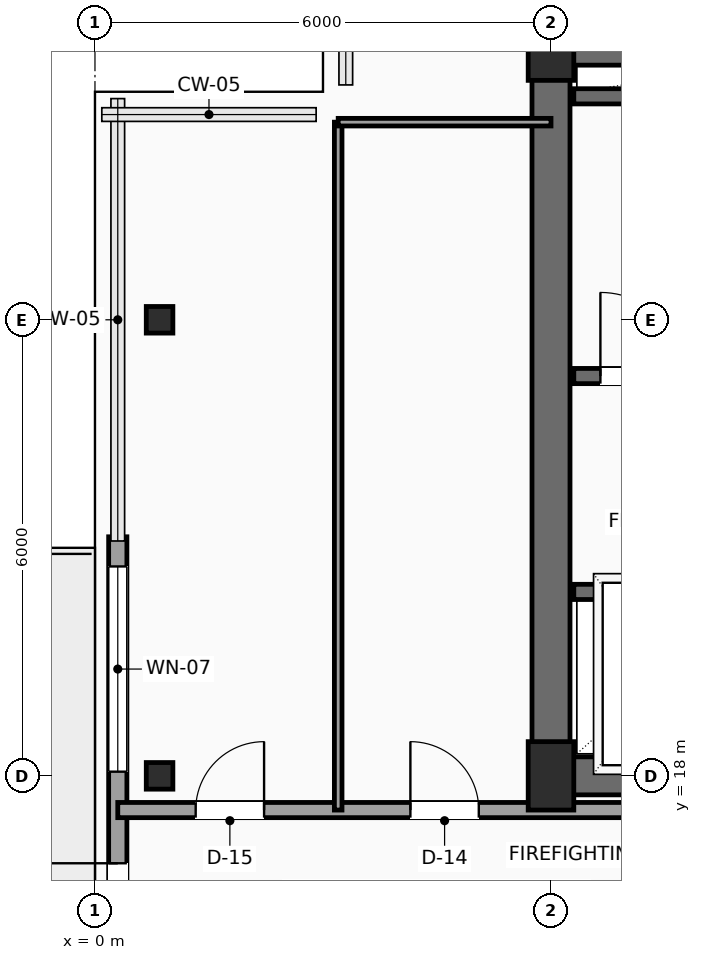
"""IFC4 building model, lengths in metres.
Left out: names, types, materials, properties, quantities, classifications, styles, units other than length and angle.
Written with IfcOpenShell. Run it as: python <this file> out.ifc"""

import sys

from ifc_helpers import new_model, si_unit, direction, frame, frame_2d, origin, origin_2d, place, context, subcontext, project, spatial, rectangle, hollow_rectangle, extrude, element, fill, save


model = new_model("IFC4")
c1 = context("Model", 3, precision=1e-05, world=origin(), true_north=direction((0.0, 1.0)))
c2 = subcontext(c1, "Body", "Model", "MODEL_VIEW")
j1 = project(units=[si_unit("LENGTHUNIT", "METRE"), si_unit("PLANEANGLEUNIT", "RADIAN")], contexts=[c1])
p1 = place(None, origin())
s1 = spatial("IfcSite", under=j1, at=p1, CompositionType="ELEMENT")
p2 = place(p1, origin())
s2 = spatial("IfcBuilding", under=s1, at=p2, CompositionType="ELEMENT")
p3 = place(p2, frame((0.0, 0.0, 253.7)))
s3 = spatial("IfcBuildingStorey", under=s2, at=p3, CompositionType="ELEMENT", Elevation=253.7)
for number, where, z_axis, x_axis in (
    (1, (6.0, 18.0, 0.0), (0.0, 0.0, 1.0), (1.0, 0.0, 0.0)),
    (2, (6.0, 27.6, 0.0), (0.0, 0.0, 1.0), (1.0, 0.0, 0.0)),
):
    element("IfcColumn", number, at=place(p3, frame(where, z_axis=z_axis, x_axis=x_axis)), inside=s3, PredefinedType="COLUMN", context=c2, shape_type="SweptSolid", body=[
        extrude(rectangle(XDim=0.6, YDim=0.9, at=origin_2d()), origin(), (0.0, 0.0, 1.0), 3.5),
    ])
for number, where, z_axis, x_axis in (
    (3, (0.85, 18.0, 0.0), (0.0, 0.0, 1.0), (1.0, 0.0, 0.0)),
    (4, (0.85, 24.0, 0.0), (0.0, 0.0, 1.0), (1.0, 0.0, 0.0)),
):
    element("IfcColumn", number, at=place(p3, frame(where, z_axis=z_axis, x_axis=x_axis)), inside=s3, PredefinedType="COLUMN", context=c2, shape_type="SweptSolid", body=[
        extrude(hollow_rectangle(XDim=0.35, YDim=0.35, WallThickness=0.016, InnerFilletRadius=0.016, OuterFilletRadius=0.032, at=origin_2d()), origin(), (0.0, 0.0, 1.0), 3.5),
    ])
p4 = place(p3, frame((0.3, 11.855, 0.0), z_axis=(0.0, 0.0, 1.0), x_axis=(0.0, 1.0, 0.0)))
e5 = element("IfcWall", 5, at=p4, inside=s3, PredefinedType="SOLIDWALL", context=c2, shape_type="SweptSolid", body=[
    extrude(rectangle(XDim=9.29, YDim=0.24, at=frame_2d((4.645, 0.0))), origin(), (0.0, 0.0, 1.0), 3.3),
])
p5 = place(p4, frame((3.945, 0.0, 0.0)))
e6 = element("IfcOpeningElement", 6, at=p5, cuts=e5, PredefinedType="OPENING", context=c2, shape_type="SweptSolid", body=[
    extrude(rectangle(XDim=1.05, YDim=2.2, at=frame_2d((0.525, 1.1))), frame((0.0, 0.13, 0.0), z_axis=(0.0, -1.0, 0.0), x_axis=(1.0, 0.0, 0.0)), (0.0, 0.0, 1.0), 0.26),
])
p6 = place(p4, frame((6.2, 0.0, 0.6)))
e7 = element("IfcOpeningElement", 7, at=p6, cuts=e5, PredefinedType="OPENING", context=c2, shape_type="SweptSolid", body=[
    extrude(rectangle(XDim=2.7, YDim=2.3, at=frame_2d((1.35, 1.15))), frame((0.0, 0.13, 0.0), z_axis=(0.0, -1.0, 0.0), x_axis=(1.0, 0.0, 0.0)), (0.0, 0.0, 1.0), 0.26),
])
p7 = place(p4, frame((0.7, 0.0, 0.6)))
e8 = element("IfcOpeningElement", 8, at=p7, cuts=e5, PredefinedType="OPENING", context=c2, shape_type="SweptSolid", body=[
    extrude(rectangle(XDim=0.9, YDim=2.2, at=frame_2d((0.45, 1.1))), frame((0.0, 0.13, 0.0), z_axis=(0.0, -1.0, 0.0), x_axis=(1.0, 0.0, 0.0)), (0.0, 0.0, 1.0), 0.26),
])
p8 = place(p3, frame((6.0, 18.0, 0.0), z_axis=(0.0, 0.0, 1.0), x_axis=(1.0, 0.0, 0.0)))
e9 = element("IfcWall", 9, at=p8, inside=s3, PredefinedType="SHEAR", context=c2, shape_type="SweptSolid", body=[
    extrude(rectangle(XDim=12.0, YDim=0.5, at=frame_2d((6.0, 0.0))), origin(), (0.0, 0.0, 1.0), 3.3),
])
p9 = place(p8, frame((7.15, 0.0, 0.0)))
e10 = element("IfcOpeningElement", 10, at=p9, cuts=e9, PredefinedType="OPENING", context=c2, shape_type="SweptSolid", body=[
    extrude(rectangle(XDim=1.6, YDim=2.3, at=frame_2d((0.8, 1.15))), frame((0.0, 0.26, 0.0), z_axis=(0.0, -1.0, 0.0), x_axis=(1.0, 0.0, 0.0)), (0.0, 0.0, 1.0), 0.52),
])
p10 = place(p3, frame((6.0, 27.6, 0.0), z_axis=(0.0, 0.0, 1.0), x_axis=(1.0, 0.0, 0.0)))
e11 = element("IfcWall", 11, at=p10, inside=s3, PredefinedType="SHEAR", context=c2, shape_type="SweptSolid", body=[
    extrude(rectangle(XDim=12.0, YDim=0.5, at=frame_2d((6.0, 0.0))), origin(), (0.0, 0.0, 1.0), 3.3),
])
p11 = place(p10, frame((10.3, 0.0, 0.0)))
e12 = element("IfcOpeningElement", 12, at=p11, cuts=e11, PredefinedType="OPENING", context=c2, shape_type="SweptSolid", body=[
    extrude(rectangle(XDim=0.9, YDim=2.15, at=frame_2d((0.45, 1.075))), frame((0.0, 0.26, 0.0), z_axis=(0.0, -1.0, 0.0), x_axis=(1.0, 0.0, 0.0)), (0.0, 0.0, 1.0), 0.52),
])
p12 = place(p3, frame((6.0, 18.0, 0.0), z_axis=(0.0, 0.0, 1.0), x_axis=(0.0, 1.0, 0.0)))
e13 = element("IfcWall", 13, at=p12, inside=s3, PredefinedType="SHEAR", context=c2, shape_type="SweptSolid", body=[
    extrude(rectangle(XDim=9.6, YDim=0.5, at=frame_2d((4.8, 0.0))), origin(), (0.0, 0.0, 1.0), 3.3),
])
p13 = place(p3, frame((6.3, 23.26, 0.0), z_axis=(0.0, 0.0, 1.0), x_axis=(1.0, 0.0, 0.0)))
e14 = element("IfcWall", 14, at=p13, inside=s3, PredefinedType="SHEAR", context=c2, shape_type="SweptSolid", body=[
    extrude(rectangle(XDim=8.88, YDim=0.2, at=frame_2d((4.44, 0.0))), origin(), (0.0, 0.0, 1.0), 3.3),
])
p14 = place(p13, frame((0.35, 0.0, 0.0)))
e15 = element("IfcOpeningElement", 15, at=p14, cuts=e14, PredefinedType="OPENING", context=c2, shape_type="SweptSolid", body=[
    extrude(rectangle(XDim=1.1, YDim=2.2, at=frame_2d((0.55, 1.1))), frame((0.0, 0.11, 0.0), z_axis=(0.0, -1.0, 0.0), x_axis=(1.0, 0.0, 0.0)), (0.0, 0.0, 1.0), 0.22),
])
p15 = place(p3, frame((6.3, 26.94, 0.0), z_axis=(0.0, 0.0, 1.0), x_axis=(1.0, 0.0, 0.0)))
e16 = element("IfcWall", 16, at=p15, inside=s3, PredefinedType="SHEAR", context=c2, shape_type="SweptSolid", body=[
    extrude(rectangle(XDim=8.88, YDim=0.2, at=frame_2d((4.44, 0.0))), origin(), (0.0, 0.0, 1.0), 3.3),
])
p16 = place(p3, frame((6.3, 20.42, 0.0), z_axis=(0.0, 0.0, 1.0), x_axis=(1.0, 0.0, 0.0)))
e17 = element("IfcWall", 17, at=p16, inside=s3, PredefinedType="SHEAR", context=c2, shape_type="SweptSolid", body=[
    extrude(rectangle(XDim=4.95, YDim=0.2, at=frame_2d((2.475, 0.0))), origin(), (0.0, 0.0, 1.0), 3.3),
])
p17 = place(p16, frame((0.65, 0.0, 0.0)))
e18 = element("IfcOpeningElement", 18, at=p17, cuts=e17, PredefinedType="OPENING", context=c2, shape_type="SweptSolid", body=[
    extrude(rectangle(XDim=1.1, YDim=2.2, at=frame_2d((0.55, 1.1))), frame((0.0, 0.11, 0.0), z_axis=(0.0, -1.0, 0.0), x_axis=(1.0, 0.0, 0.0)), (0.0, 0.0, 1.0), 0.22),
])
p18 = place(p16, frame((3.05, 0.0, 0.0)))
e19 = element("IfcOpeningElement", 19, at=p18, cuts=e17, PredefinedType="OPENING", context=c2, shape_type="SweptSolid", body=[
    extrude(rectangle(XDim=1.1, YDim=2.2, at=frame_2d((0.55, 1.1))), frame((0.0, 0.11, 0.0), z_axis=(0.0, -1.0, 0.0), x_axis=(1.0, 0.0, 0.0)), (0.0, 0.0, 1.0), 0.22),
])
p19 = place(p3, frame((0.3, 17.55, 0.0), z_axis=(0.0, 0.0, 1.0), x_axis=(1.0, 0.0, 0.0)))
e20 = element("IfcWall", 20, at=p19, inside=s3, PredefinedType="SOLIDWALL", context=c2, shape_type="SweptSolid", body=[
    extrude(rectangle(XDim=12.3, YDim=0.2, at=frame_2d((6.15, 0.0))), origin(), (0.0, 0.0, 1.0), 3.3),
])
p20 = place(p19, frame((1.025, 0.0, 0.0)))
e21 = element("IfcOpeningElement", 21, at=p20, cuts=e20, PredefinedType="OPENING", context=c2, shape_type="SweptSolid", body=[
    extrude(rectangle(XDim=0.9, YDim=2.1, at=frame_2d((0.45, 1.05))), frame((0.0, 0.11, 0.0), z_axis=(0.0, -1.0, 0.0), x_axis=(1.0, 0.0, 0.0)), (0.0, 0.0, 1.0), 0.22),
])
p21 = place(p19, frame((3.85, 0.0, 0.0)))
e22 = element("IfcOpeningElement", 22, at=p21, cuts=e20, PredefinedType="OPENING", context=c2, shape_type="SweptSolid", body=[
    extrude(rectangle(XDim=0.9, YDim=2.1, at=frame_2d((0.45, 1.05))), frame((0.0, 0.11, 0.0), z_axis=(0.0, -1.0, 0.0), x_axis=(1.0, 0.0, 0.0)), (0.0, 0.0, 1.0), 0.22),
])
p22 = place(p3, frame((3.2, 17.55, 0.0), z_axis=(0.0, 0.0, 1.0), x_axis=(0.0, 1.0, 0.0)))
e23 = element("IfcWall", 23, at=p22, inside=s3, PredefinedType="PARTITIONING", context=c2, shape_type="SweptSolid", body=[
    extrude(rectangle(XDim=9.05, YDim=0.1, at=frame_2d((4.525, 0.0))), origin(), (0.0, 0.0, 1.0), 3.3),
])
p23 = place(p3, frame((3.2, 26.6, 0.0), z_axis=(0.0, 0.0, 1.0), x_axis=(1.0, 0.0, 0.0)))
e24 = element("IfcWall", 24, at=p23, inside=s3, PredefinedType="PARTITIONING", context=c2, shape_type="SweptSolid", body=[
    extrude(rectangle(XDim=2.8, YDim=0.1, at=frame_2d((1.4, 0.0))), origin(), (0.0, 0.0, 1.0), 3.3),
])
p24 = place(p5, origin())
e25 = element("IfcDoor", 25, at=p24, inside=s3, OperationType="SINGLE_SWING_RIGHT", PredefinedType="DOOR", context=c2, shape_type="SweptSolid", body=[
    extrude(rectangle(XDim=1.05, YDim=2.2, at=frame_2d((0.525, 1.1))), frame((0.0, 0.025, 0.0), z_axis=(0.0, -1.0, 0.0), x_axis=(1.0, 0.0, 0.0)), (0.0, 0.0, 1.0), 0.05),
])
fill(e6, e25)
p25 = place(p6, origin())
e26 = element("IfcWindow", 26, at=p25, inside=s3, PartitioningType="SINGLE_PANEL", PredefinedType="WINDOW", context=c2, shape_type="SweptSolid", body=[
    extrude(rectangle(XDim=2.7, YDim=2.3, at=frame_2d((1.35, 1.15))), frame((0.0, 0.03, 0.0), z_axis=(0.0, -1.0, 0.0), x_axis=(1.0, 0.0, 0.0)), (0.0, 0.0, 1.0), 0.06),
])
fill(e7, e26)
p26 = place(p14, origin())
e27 = element("IfcDoor", 27, at=p26, inside=s3, OperationType="SINGLE_SWING_LEFT", PredefinedType="DOOR", context=c2, shape_type="SweptSolid", body=[
    extrude(rectangle(XDim=1.1, YDim=2.2, at=frame_2d((0.55, 1.1))), frame((0.0, 0.025, 0.0), z_axis=(0.0, -1.0, 0.0), x_axis=(1.0, 0.0, 0.0)), (0.0, 0.0, 1.0), 0.05),
])
fill(e15, e27)
p27 = place(p20, origin())
e28 = element("IfcDoor", 28, at=p27, inside=s3, OperationType="SINGLE_SWING_RIGHT", PredefinedType="DOOR", context=c2, shape_type="SweptSolid", body=[
    extrude(rectangle(XDim=0.9, YDim=2.1, at=frame_2d((0.45, 1.05))), frame((0.0, 0.025, 0.0), z_axis=(0.0, -1.0, 0.0), x_axis=(1.0, 0.0, 0.0)), (0.0, 0.0, 1.0), 0.05),
])
fill(e21, e28)
p28 = place(p21, origin())
e29 = element("IfcDoor", 29, at=p28, inside=s3, OperationType="SINGLE_SWING_LEFT", PredefinedType="DOOR", context=c2, shape_type="SweptSolid", body=[
    extrude(rectangle(XDim=0.9, YDim=2.1, at=frame_2d((0.45, 1.05))), frame((0.0, 0.025, 0.0), z_axis=(0.0, -1.0, 0.0), x_axis=(1.0, 0.0, 0.0)), (0.0, 0.0, 1.0), 0.05),
])
fill(e22, e29)
save(model, sys.argv[1])
